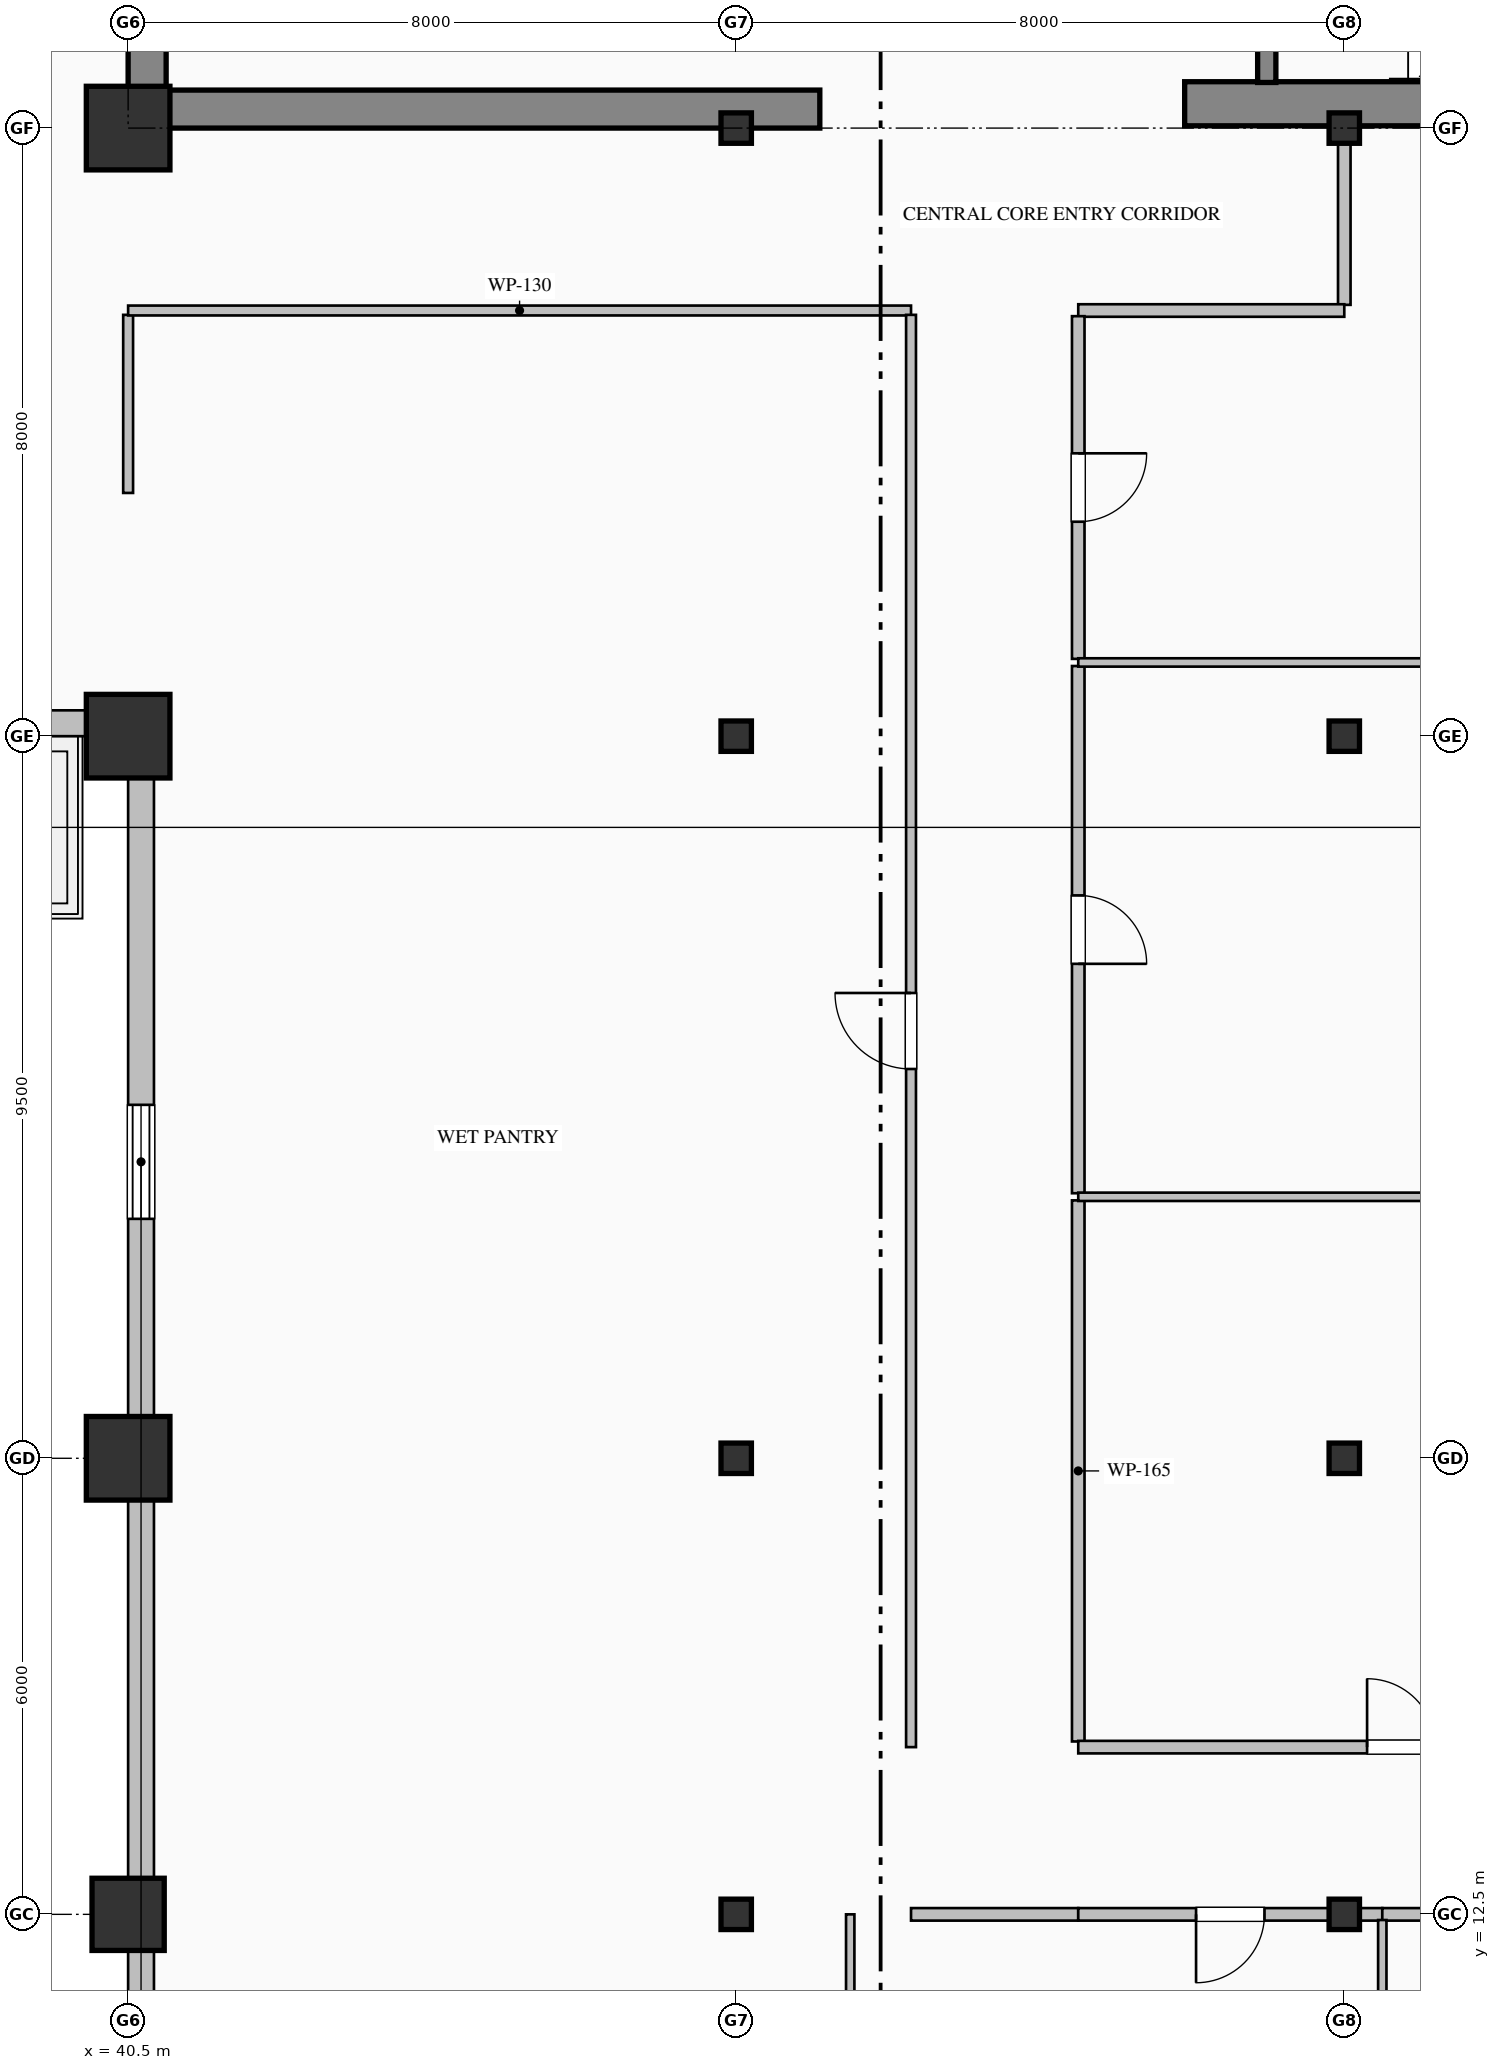
"""IFC4 building model, lengths in metres.
Left out: names, types, materials, properties, quantities, classifications, styles, units other than length and angle.
Written with IfcOpenShell. Run it as: python <this file> out.ifc"""

import sys

from ifc_helpers import new_model, si_unit, direction, frame, frame_2d, origin, origin_2d, place, context, subcontext, project, spatial, rectangle, hollow_rectangle, i_section, extrude, element, fill, save


model = new_model("IFC4")
c1 = context("Model", 3, precision=1e-05, world=origin(), true_north=direction((0.0, 1.0)))
c2 = subcontext(c1, "Body", "Model", "MODEL_VIEW")
j1 = project(units=[si_unit("LENGTHUNIT", "METRE"), si_unit("PLANEANGLEUNIT", "RADIAN")], contexts=[c1])
p1 = place(None, origin())
s1 = spatial("IfcSite", under=j1, at=p1, CompositionType="ELEMENT")
p2 = place(p1, origin())
s2 = spatial("IfcBuilding", under=s1, at=p2, CompositionType="ELEMENT")
p3 = place(p2, frame((0.0, 0.0, 187.0)))
s3 = spatial("IfcBuildingStorey", under=s2, at=p3, CompositionType="ELEMENT", Elevation=187.0)
p4 = place(p3, frame((40.75, 36.5, 0.0), z_axis=(0.0, 0.0, 1.0), x_axis=(0.0, 1.0, 0.0)))
e1 = element("IfcWall", 1, at=p4, inside=s3, PredefinedType="SHEAR", context=c2, shape_type="SweptSolid", body=[
    extrude(rectangle(XDim=7.9, YDim=0.5, at=frame_2d((3.95, 0.0))), origin(), (0.0, 0.0, 1.0), 3.765),
])
p5 = place(p3, frame((40.5, 36.25, 0.0), z_axis=(0.0, 0.0, 1.0), x_axis=(1.0, 0.0, 0.0)))
e2 = element("IfcWall", 2, at=p5, inside=s3, PredefinedType="SHEAR", context=c2, shape_type="SweptSolid", body=[
    extrude(rectangle(XDim=9.1, YDim=0.5, at=frame_2d((4.55, 0.0))), origin(), (0.0, 0.0, 1.0), 3.765),
])
p6 = place(p3, frame((54.4, 36.32, 0.0), z_axis=(0.0, 0.0, 1.0), x_axis=(1.0, 0.0, 0.0)))
e3 = element("IfcWall", 3, at=p6, inside=s3, PredefinedType="SHEAR", context=c2, shape_type="SweptSolid", body=[
    extrude(rectangle(XDim=9.6, YDim=0.58, at=frame_2d((4.8, 0.0))), origin(), (0.0, 0.0, 1.0), 4.0),
])
p7 = place(p3, frame((40.5, 12.5, 0.0), z_axis=(0.0, 0.0, 1.0), x_axis=(1.0, 0.0, 0.0)))
e4 = element("IfcColumn", 4, at=p7, inside=s3, PredefinedType="COLUMN", context=c2, shape_type="SweptSolid", body=[
    extrude(hollow_rectangle(XDim=0.95, YDim=0.95, WallThickness=0.036, at=origin_2d()), origin(), (0.0, 0.0, 1.0), 4.0),
])
for number, where, z_axis, x_axis in (
    (5, (40.5, 18.5, 0.0), (0.0, 0.0, 1.0), (1.0, 0.0, 0.0)),
    (6, (40.5, 28.0, 0.0), (0.0, 0.0, 1.0), (1.0, 0.0, 0.0)),
    (7, (40.5, 36.0, 0.0), (0.0, 0.0, 1.0), (1.0, 0.0, 0.0)),
):
    element("IfcColumn", number, at=place(p3, frame(where, z_axis=z_axis, x_axis=x_axis)), inside=s3, PredefinedType="COLUMN", context=c2, shape_type="SweptSolid", body=[
        extrude(hollow_rectangle(XDim=1.1, YDim=1.1, WallThickness=0.04, at=origin_2d()), origin(), (0.0, 0.0, 1.0), 4.0),
    ])
for number, where, z_axis, x_axis in (
    (8, (48.5, 12.5, 0.0), (0.0, 0.0, 1.0), (1.0, 0.0, 0.0)),
    (9, (48.5, 18.5, 0.0), (0.0, 0.0, 1.0), (1.0, 0.0, 0.0)),
    (10, (48.5, 28.0, 0.0), (0.0, 0.0, 1.0), (1.0, 0.0, 0.0)),
    (11, (48.5, 36.0, 0.0), (0.0, 0.0, 1.0), (1.0, 0.0, 0.0)),
    (12, (56.5, 12.5, 0.0), (0.0, 0.0, 1.0), (1.0, 0.0, 0.0)),
    (13, (56.5, 18.5, 0.0), (0.0, 0.0, 1.0), (1.0, 0.0, 0.0)),
    (14, (56.5, 28.0, 0.0), (0.0, 0.0, 1.0), (1.0, 0.0, 0.0)),
    (15, (56.5, 36.0, 0.0), (0.0, 0.0, 1.0), (1.0, 0.0, 0.0)),
):
    element("IfcColumn", number, at=place(p3, frame(where, z_axis=z_axis, x_axis=x_axis)), inside=s3, PredefinedType="COLUMN", context=c2, shape_type="SweptSolid", body=[
        extrude(i_section(OverallWidth=0.4, OverallDepth=0.4, WebThickness=0.013, FlangeThickness=0.021, FilletRadius=0.022, at=origin_2d()), origin(), (0.0, 0.0, 1.0), 4.0),
    ])
p8 = place(p3, frame((40.67, 8.0, 0.0), z_axis=(0.0, 0.0, 1.0), x_axis=(0.0, 1.0, 0.0)))
e16 = element("IfcWall", 16, at=p8, inside=s3, PredefinedType="SOLIDWALL", context=c2, shape_type="SweptSolid", body=[
    extrude(rectangle(XDim=20.34, YDim=0.34, at=frame_2d((10.17, 0.0))), origin(), (0.0, 0.0, 1.0), 3.165),
])
p9 = place(p8, frame((13.65, 0.0, 0.85)))
e17 = element("IfcOpeningElement", 17, at=p9, cuts=e16, PredefinedType="OPENING", context=c2, shape_type="SweptSolid", body=[
    extrude(rectangle(XDim=1.5, YDim=1.95, at=frame_2d((0.75, 0.975))), frame((0.0, 0.18, 0.0), z_axis=(0.0, -1.0, 0.0), x_axis=(1.0, 0.0, 0.0)), (0.0, 0.0, 1.0), 0.36),
])
p10 = place(p3, frame((40.52, 28.17, 0.0), z_axis=(0.0, 0.0, 1.0), x_axis=(-1.0, 0.0, 0.0)))
e18 = element("IfcWall", 18, at=p10, inside=s3, PredefinedType="SOLIDWALL", context=c2, shape_type="SweptSolid", body=[
    extrude(rectangle(XDim=27.52, YDim=0.34, at=frame_2d((13.76, 0.0))), origin(), (0.0, 0.0, 1.0), 3.165),
])
p11 = place(p10, frame((17.4, 0.0, 0.7)))
e19 = element("IfcOpeningElement", 19, at=p11, cuts=e18, PredefinedType="OPENING", context=c2, shape_type="SweptSolid", body=[
    extrude(rectangle(XDim=1.2, YDim=1.85, at=frame_2d((0.6, 0.925))), frame((0.0, 0.18, 0.0), z_axis=(0.0, -1.0, 0.0), x_axis=(1.0, 0.0, 0.0)), (0.0, 0.0, 1.0), 0.36),
])
p12 = place(p10, frame((20.85, 0.0, 0.85)))
e20 = element("IfcOpeningElement", 20, at=p12, cuts=e18, PredefinedType="OPENING", context=c2, shape_type="SweptSolid", body=[
    extrude(rectangle(XDim=1.5, YDim=1.95, at=frame_2d((0.75, 0.975))), frame((0.0, 0.18, 0.0), z_axis=(0.0, -1.0, 0.0), x_axis=(1.0, 0.0, 0.0)), (0.0, 0.0, 1.0), 0.36),
])
p13 = place(p10, frame((11.395, 0.0, 0.0)))
e21 = element("IfcOpeningElement", 21, at=p13, cuts=e18, PredefinedType="OPENING", context=c2, shape_type="SweptSolid", body=[
    extrude(rectangle(XDim=1.25, YDim=2.25, at=frame_2d((0.625, 1.125))), frame((0.0, 0.18, 0.0), z_axis=(0.0, -1.0, 0.0), x_axis=(1.0, 0.0, 0.0)), (0.0, 0.0, 1.0), 0.36),
])
p14 = place(p3, frame((55.48, 39.75, 0.0), z_axis=(0.0, 0.0, 1.0), x_axis=(0.0, -1.0, 0.0)))
e22 = element("IfcWall", 22, at=p14, inside=s3, PredefinedType="SOLIDWALL", context=c2, shape_type="SweptSolid", body=[
    extrude(rectangle(XDim=3.15, YDim=0.24, at=frame_2d((1.575, 0.0))), origin(), (0.0, 0.0, 1.0), 4.0),
])
p15 = place(p14, frame((1.0, 0.0, 0.0)))
e23 = element("IfcOpeningElement", 23, at=p15, cuts=e22, PredefinedType="OPENING", context=c2, shape_type="SweptSolid", body=[
    extrude(rectangle(XDim=1.15, YDim=2.2, at=frame_2d((0.575, 1.1))), frame((0.0, 0.13, 0.0), z_axis=(0.0, -1.0, 0.0), x_axis=(1.0, 0.0, 0.0)), (0.0, 0.0, 1.0), 0.26),
])
p16 = place(p3, frame((40.5, 33.543, 0.0), z_axis=(0.0, 0.0, 1.0), x_axis=(0.0, -1.0, 0.0)))
e24 = element("IfcWall", 24, at=p16, inside=s3, PredefinedType="PARTITIONING", context=c2, shape_type="SweptSolid", body=[
    extrude(rectangle(XDim=2.343, YDim=0.13, at=frame_2d((1.171, 0.0))), origin(), (0.0, 0.0, 1.0), 3.157),
])
p17 = place(p3, frame((56.5, 36.0, 0.0), z_axis=(0.0, 0.0, 1.0), x_axis=(0.0, -1.0, 0.0)))
e25 = element("IfcWall", 25, at=p17, inside=s3, PredefinedType="PARTITIONING", context=c2, shape_type="SweptSolid", body=[
    extrude(rectangle(XDim=2.325, YDim=0.165, at=frame_2d((1.163, 0.0))), origin(), (0.0, 0.0, 1.0), 3.157),
])
p18 = place(p3, frame((56.5, 33.6, 0.0), z_axis=(0.0, 0.0, 1.0), x_axis=(-1.0, 0.0, 0.0)))
e26 = element("IfcWall", 26, at=p18, inside=s3, PredefinedType="PARTITIONING", context=c2, shape_type="SweptSolid", body=[
    extrude(rectangle(XDim=3.5, YDim=0.165, at=frame_2d((1.75, 0.0))), origin(), (0.0, 0.0, 1.0), 3.765),
])
p19 = place(p3, frame((50.8, 33.6, 0.0), z_axis=(0.0, 0.0, 1.0), x_axis=(-1.0, 0.0, 0.0)))
e27 = element("IfcWall", 27, at=p19, inside=s3, PredefinedType="PARTITIONING", context=c2, shape_type="SweptSolid", body=[
    extrude(rectangle(XDim=10.3, YDim=0.13, at=frame_2d((5.15, 0.0))), origin(), (0.0, 0.0, 1.0), 3.765),
])
p20 = place(p3, frame((53.0, 21.893, 0.0), z_axis=(0.0, 0.0, 1.0), x_axis=(0.0, -1.0, 0.0)))
e28 = element("IfcWall", 28, at=p20, inside=s3, PredefinedType="PARTITIONING", context=c2, shape_type="SweptSolid", body=[
    extrude(rectangle(XDim=7.119, YDim=0.165, at=frame_2d((3.559, 0.0))), origin(), (0.0, 0.0, 1.0), 3.765),
])
p21 = place(p3, frame((53.0, 28.923, 0.0), z_axis=(0.0, 0.0, 1.0), x_axis=(0.0, -1.0, 0.0)))
e29 = element("IfcWall", 29, at=p21, inside=s3, PredefinedType="PARTITIONING", context=c2, shape_type="SweptSolid", body=[
    extrude(rectangle(XDim=6.936, YDim=0.165, at=frame_2d((3.468, 0.0))), origin(), (0.0, 0.0, 1.0), 3.765),
])
p22 = place(p21, frame((3.018, 0.0, 0.0)))
e30 = element("IfcOpeningElement", 30, at=p22, cuts=e29, PredefinedType="OPENING", context=c2, shape_type="SweptSolid", body=[
    extrude(rectangle(XDim=0.9, YDim=2.15, at=frame_2d((0.45, 1.075))), frame((0.0, 0.093, 0.0), z_axis=(0.0, -1.0, 0.0), x_axis=(1.0, 0.0, 0.0)), (0.0, 0.0, 1.0), 0.185),
])
p23 = place(p3, frame((53.0, 33.525, 0.0), z_axis=(0.0, 0.0, 1.0), x_axis=(0.0, -1.0, 0.0)))
e31 = element("IfcWall", 31, at=p23, inside=s3, PredefinedType="PARTITIONING", context=c2, shape_type="SweptSolid", body=[
    extrude(rectangle(XDim=4.508, YDim=0.165, at=frame_2d((2.254, 0.0))), origin(), (0.0, 0.0, 1.0), 3.765),
])
p24 = place(p23, frame((1.804, 0.0, 0.0)))
e32 = element("IfcOpeningElement", 32, at=p24, cuts=e31, PredefinedType="OPENING", context=c2, shape_type="SweptSolid", body=[
    extrude(rectangle(XDim=0.9, YDim=2.15, at=frame_2d((0.45, 1.075))), frame((0.0, 0.093, 0.0), z_axis=(0.0, -1.0, 0.0), x_axis=(1.0, 0.0, 0.0)), (0.0, 0.0, 1.0), 0.185),
])
p25 = place(p3, frame((50.8, 14.7, 0.0), z_axis=(0.0, 0.0, 1.0), x_axis=(0.0, 1.0, 0.0)))
e33 = element("IfcWall", 33, at=p25, inside=s3, PredefinedType="PARTITIONING", context=c2, shape_type="SweptSolid", body=[
    extrude(rectangle(XDim=18.843, YDim=0.13, at=frame_2d((9.421, 0.0))), origin(), (0.0, 0.0, 1.0), 3.765),
])
p26 = place(p25, frame((8.921, 0.0, 0.0)))
e34 = element("IfcOpeningElement", 34, at=p26, cuts=e33, PredefinedType="OPENING", context=c2, shape_type="SweptSolid", body=[
    extrude(rectangle(XDim=1.0, YDim=2.15, at=frame_2d((0.5, 1.075))), frame((0.0, 0.075, 0.0), z_axis=(0.0, -1.0, 0.0), x_axis=(1.0, 0.0, 0.0)), (0.0, 0.0, 1.0), 0.15),
])
p27 = place(p3, frame((53.0, 12.5, 0.0), z_axis=(0.0, 0.0, 1.0), x_axis=(-1.0, 0.0, 0.0)))
e35 = element("IfcWall", 35, at=p27, inside=s3, PredefinedType="PARTITIONING", context=c2, shape_type="SweptSolid", body=[
    extrude(rectangle(XDim=2.2, YDim=0.165, at=frame_2d((1.1, 0.0))), origin(), (0.0, 0.0, 1.0), 3.157),
])
p28 = place(p3, frame((53.0, 14.7, 0.0), z_axis=(0.0, 0.0, 1.0), x_axis=(1.0, 0.0, 0.0)))
e36 = element("IfcWall", 36, at=p28, inside=s3, PredefinedType="PARTITIONING", context=c2, shape_type="SweptSolid", body=[
    extrude(rectangle(XDim=8.5, YDim=0.165, at=frame_2d((4.25, 0.0))), origin(), (0.0, 0.0, 1.0), 3.765),
])
p29 = place(p28, frame((3.8, 0.0, 0.0)))
e37 = element("IfcOpeningElement", 37, at=p29, cuts=e36, PredefinedType="OPENING", context=c2, shape_type="SweptSolid", body=[
    extrude(rectangle(XDim=0.9, YDim=2.15, at=frame_2d((0.45, 1.075))), frame((0.0, 0.093, 0.0), z_axis=(0.0, -1.0, 0.0), x_axis=(1.0, 0.0, 0.0)), (0.0, 0.0, 1.0), 0.185),
])
p30 = place(p3, frame((57.0, 12.5, 0.0), z_axis=(0.0, 0.0, 1.0), x_axis=(-1.0, 0.0, 0.0)))
e38 = element("IfcWall", 38, at=p30, inside=s3, PredefinedType="PARTITIONING", context=c2, shape_type="SweptSolid", body=[
    extrude(rectangle(XDim=4.0, YDim=0.165, at=frame_2d((2.0, 0.0))), origin(), (0.0, 0.0, 1.0), 3.157),
])
p31 = place(p30, frame((1.55, 0.0, 0.0)))
e39 = element("IfcOpeningElement", 39, at=p31, cuts=e38, PredefinedType="OPENING", context=c2, shape_type="SweptSolid", body=[
    extrude(rectangle(XDim=0.9, YDim=2.15, at=frame_2d((0.45, 1.075))), frame((0.0, 0.093, 0.0), z_axis=(0.0, -1.0, 0.0), x_axis=(1.0, 0.0, 0.0)), (0.0, 0.0, 1.0), 0.185),
])
p32 = place(p3, frame((61.5, 12.5, 0.0), z_axis=(0.0, 0.0, 1.0), x_axis=(-1.0, 0.0, 0.0)))
e40 = element("IfcWall", 40, at=p32, inside=s3, PredefinedType="PARTITIONING", context=c2, shape_type="SweptSolid", body=[
    extrude(rectangle(XDim=4.5, YDim=0.165, at=frame_2d((2.25, 0.0))), origin(), (0.0, 0.0, 1.0), 3.157),
])
p33 = place(p32, frame((1.76, 0.0, 0.0)))
e41 = element("IfcOpeningElement", 41, at=p33, cuts=e40, PredefinedType="OPENING", context=c2, shape_type="SweptSolid", body=[
    extrude(rectangle(XDim=0.98, YDim=2.25, at=frame_2d((0.49, 1.125))), frame((0.0, 0.093, 0.0), z_axis=(0.0, -1.0, 0.0), x_axis=(1.0, 0.0, 0.0)), (0.0, 0.0, 1.0), 0.185),
])
for number, where, z_axis, x_axis in (
    (42, (53.0, 21.94, 0.0), (0.0, 0.0, 1.0), (1.0, 0.0, 0.0)),
    (43, (53.0, 28.97, 0.0), (0.0, 0.0, 1.0), (1.0, 0.0, 0.0)),
):
    element("IfcWall", number, at=place(p3, frame(where, z_axis=z_axis, x_axis=x_axis)), inside=s3, PredefinedType="MOVABLE", context=c2, shape_type="SweptSolid", body=[
        extrude(rectangle(XDim=10.668, YDim=0.11, at=frame_2d((5.334, 0.0))), origin(), (0.0, 0.0, 1.0), 3.765),
    ])
p34 = place(p3, frame((50.0, 12.5, 0.0), z_axis=(0.0, 0.0, 1.0), x_axis=(0.0, -1.0, 0.0)))
e44 = element("IfcWall", 44, at=p34, inside=s3, PredefinedType="MOVABLE", context=c2, shape_type="SweptSolid", body=[
    extrude(rectangle(XDim=8.168, YDim=0.11, at=frame_2d((4.084, 0.0))), origin(), (0.0, 0.0, 1.0), 3.765),
])
p35 = place(p34, frame((3.534, 0.0, 0.0)))
e45 = element("IfcOpeningElement", 45, at=p35, cuts=e44, PredefinedType="OPENING", context=c2, shape_type="SweptSolid", body=[
    extrude(rectangle(XDim=1.1, YDim=2.2, at=frame_2d((0.55, 1.1))), frame((0.0, 0.065, 0.0), z_axis=(0.0, -1.0, 0.0), x_axis=(1.0, 0.0, 0.0)), (0.0, 0.0, 1.0), 0.13),
])
p36 = place(p3, frame((57.0, 12.426, 0.0), z_axis=(0.0, 0.0, 1.0), x_axis=(0.0, -1.0, 0.0)))
e46 = element("IfcWall", 46, at=p36, inside=s3, PredefinedType="MOVABLE", context=c2, shape_type="SweptSolid", body=[
    extrude(rectangle(XDim=8.094, YDim=0.11, at=frame_2d((4.047, 0.0))), origin(), (0.0, 0.0, 1.0), 3.765),
])
p37 = place(p9, origin())
e47 = element("IfcWindow", 47, at=p37, inside=s3, PartitioningType="DOUBLE_PANEL_VERTICAL", PredefinedType="WINDOW", context=c2, shape_type="SweptSolid", body=[
    extrude(rectangle(XDim=1.5, YDim=1.95, at=frame_2d((0.75, 0.975))), frame((0.0, 0.15, 0.0), z_axis=(0.0, -1.0, 0.0), x_axis=(1.0, 0.0, 0.0)), (0.0, 0.0, 1.0), 0.06),
])
fill(e17, e47)
p38 = place(p29, origin())
e48 = element("IfcDoor", 48, at=p38, inside=s3, OperationType="SINGLE_SWING_LEFT", PredefinedType="DOOR", context=c2, shape_type="SweptSolid", body=[
    extrude(rectangle(XDim=0.9, YDim=2.15, at=frame_2d((0.45, 1.075))), frame((0.0, 0.025, 0.0), z_axis=(0.0, -1.0, 0.0), x_axis=(1.0, 0.0, 0.0)), (0.0, 0.0, 1.0), 0.05),
])
fill(e37, e48)
p39 = place(p22, origin())
e49 = element("IfcDoor", 49, at=p39, inside=s3, OperationType="SINGLE_SWING_RIGHT", PredefinedType="DOOR", context=c2, shape_type="SweptSolid", body=[
    extrude(rectangle(XDim=0.9, YDim=2.15, at=frame_2d((0.45, 1.075))), frame((0.0, 0.025, 0.0), z_axis=(0.0, -1.0, 0.0), x_axis=(1.0, 0.0, 0.0)), (0.0, 0.0, 1.0), 0.05),
])
fill(e30, e49)
p40 = place(p24, origin())
e50 = element("IfcDoor", 50, at=p40, inside=s3, OperationType="SINGLE_SWING_LEFT", PredefinedType="DOOR", context=c2, shape_type="SweptSolid", body=[
    extrude(rectangle(XDim=0.9, YDim=2.15, at=frame_2d((0.45, 1.075))), frame((0.0, 0.025, 0.0), z_axis=(0.0, -1.0, 0.0), x_axis=(1.0, 0.0, 0.0)), (0.0, 0.0, 1.0), 0.05),
])
fill(e32, e50)
p41 = place(p26, origin())
e51 = element("IfcDoor", 51, at=p41, inside=s3, OperationType="SINGLE_SWING_RIGHT", PredefinedType="DOOR", context=c2, shape_type="SweptSolid", body=[
    extrude(rectangle(XDim=1.0, YDim=2.15, at=frame_2d((0.5, 1.075))), frame((0.0, 0.025, 0.0), z_axis=(0.0, -1.0, 0.0), x_axis=(1.0, 0.0, 0.0)), (0.0, 0.0, 1.0), 0.05),
])
fill(e34, e51)
p42 = place(p31, origin())
e52 = element("IfcDoor", 52, at=p42, inside=s3, OperationType="SINGLE_SWING_RIGHT", PredefinedType="DOOR", context=c2, shape_type="SweptSolid", body=[
    extrude(rectangle(XDim=0.9, YDim=2.15, at=frame_2d((0.45, 1.075))), frame((0.0, 0.025, 0.0), z_axis=(0.0, -1.0, 0.0), x_axis=(1.0, 0.0, 0.0)), (0.0, 0.0, 1.0), 0.05),
])
fill(e39, e52)
save(model, sys.argv[1])
